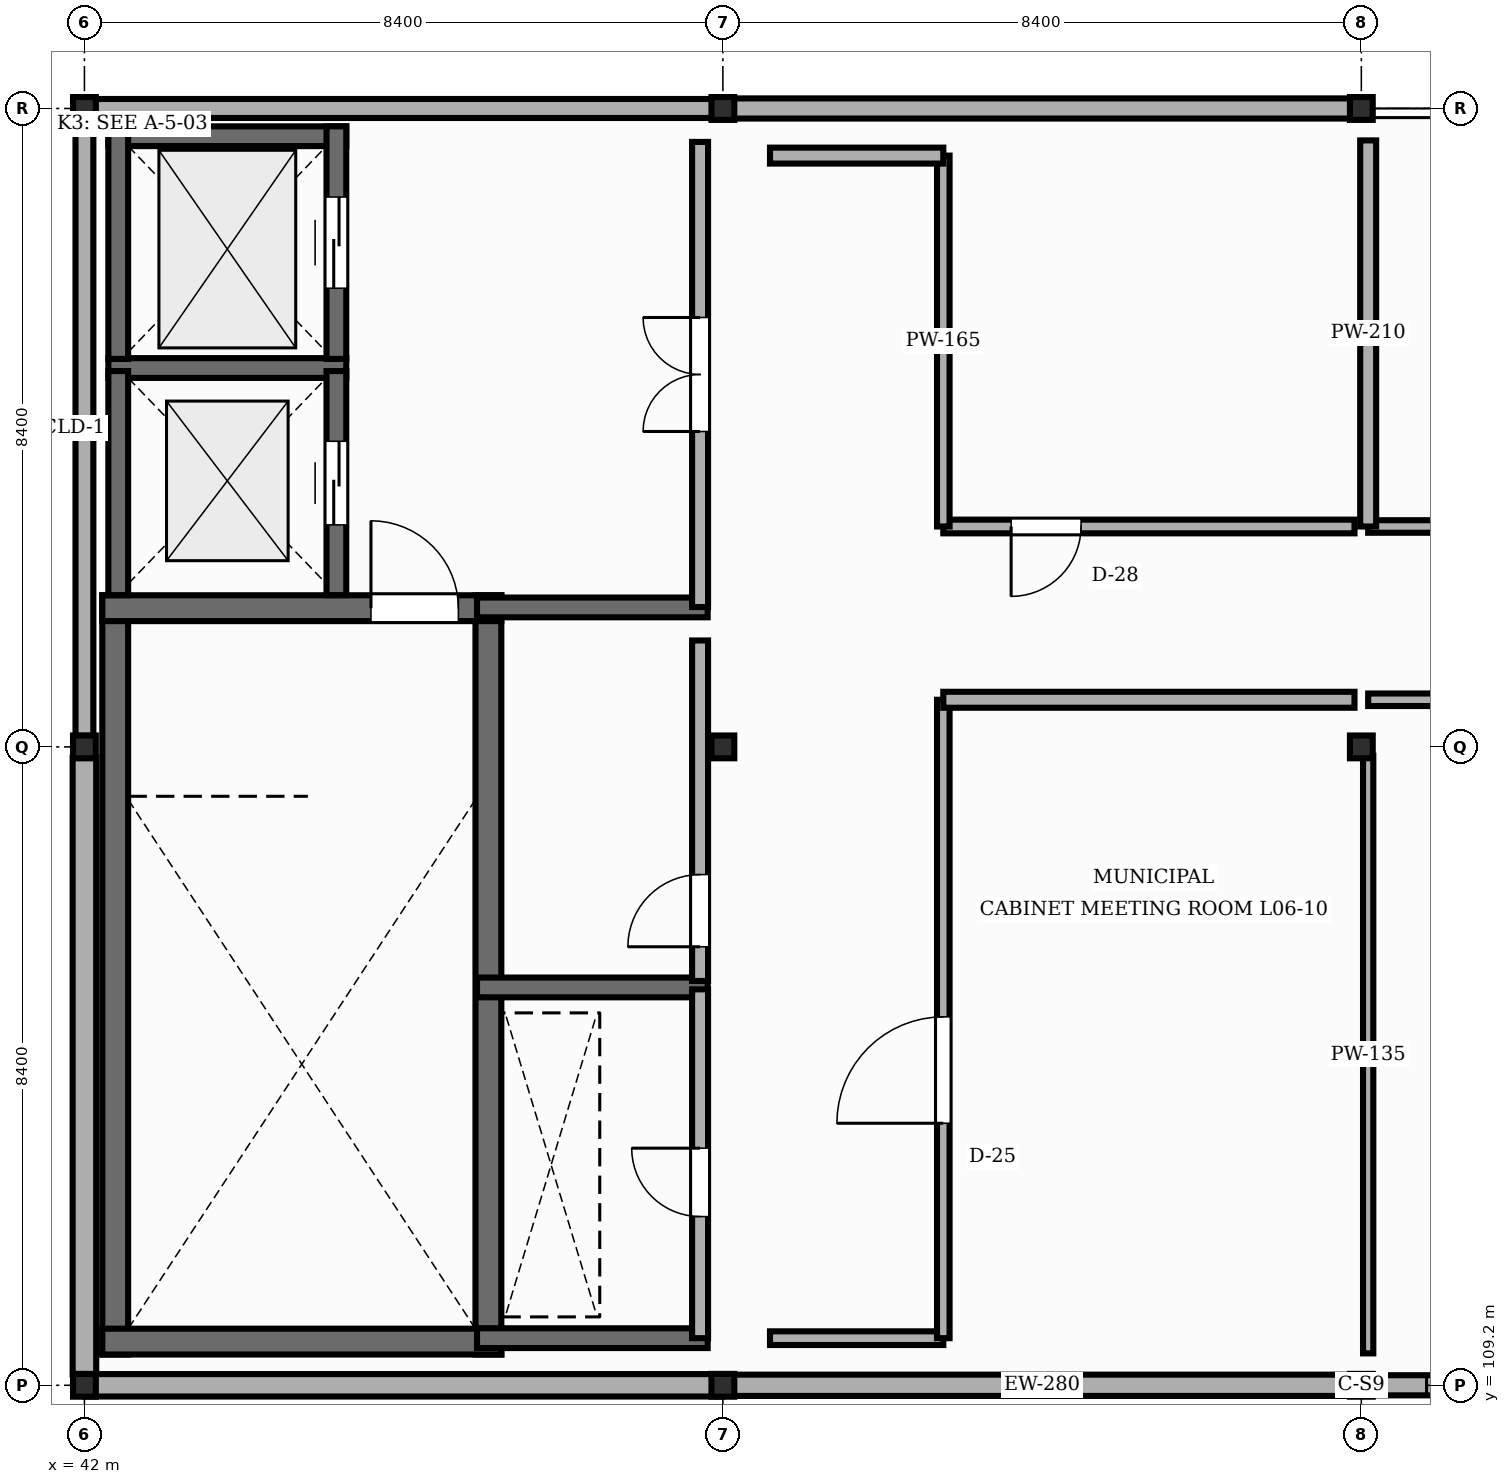
"""IFC4 building model, lengths in metres.
Left out: names, types, materials, properties, quantities, classifications, styles, units other than length and angle.
Written with IfcOpenShell. Run it as: python <this file> out.ifc"""

import sys

from ifc_helpers import new_model, si_unit, direction, frame, frame_2d, origin, origin_2d, place, context, subcontext, project, spatial, rectangle, i_section, extrude, element, fill, save


model = new_model("IFC4")
c1 = context("Model", 3, precision=1e-05, world=origin(), true_north=direction((0.0, 1.0)))
c2 = subcontext(c1, "Body", "Model", "MODEL_VIEW")
j1 = project(units=[si_unit("LENGTHUNIT", "METRE"), si_unit("PLANEANGLEUNIT", "RADIAN")], contexts=[c1])
p1 = place(None, origin())
s1 = spatial("IfcSite", under=j1, at=p1, CompositionType="ELEMENT")
p2 = place(p1, origin())
s2 = spatial("IfcBuilding", under=s1, at=p2, CompositionType="ELEMENT")
p3 = place(p2, frame((0.0, 0.0, 26.1)))
s3 = spatial("IfcBuildingStorey", under=s2, at=p3, CompositionType="ELEMENT", Elevation=26.1)
for number, where, z_axis, x_axis in (
    (1, (42.0, 109.2, 0.0), (0.0, 0.0, 1.0), (1.0, 0.0, 0.0)),
    (2, (42.0, 117.6, 0.0), (0.0, 0.0, 1.0), (1.0, 0.0, 0.0)),
    (3, (42.0, 126.0, 0.0), (0.0, 0.0, 1.0), (1.0, 0.0, 0.0)),
    (4, (50.4, 109.2, 0.0), (0.0, 0.0, 1.0), (1.0, 0.0, 0.0)),
    (5, (50.4, 117.6, 0.0), (0.0, 0.0, 1.0), (1.0, 0.0, 0.0)),
    (6, (50.4, 126.0, 0.0), (0.0, 0.0, 1.0), (1.0, 0.0, 0.0)),
    (7, (58.8, 109.2, 0.0), (0.0, 0.0, 1.0), (1.0, 0.0, 0.0)),
    (8, (58.8, 117.6, 0.0), (0.0, 0.0, 1.0), (1.0, 0.0, 0.0)),
    (9, (58.8, 126.0, 0.0), (0.0, 0.0, 1.0), (1.0, 0.0, 0.0)),
):
    element("IfcColumn", number, at=place(p3, frame(where, z_axis=z_axis, x_axis=x_axis)), inside=s3, PredefinedType="COLUMN", context=c2, shape_type="SweptSolid", body=[
        extrude(i_section(OverallWidth=0.3, OverallDepth=0.3, WebThickness=0.011, FlangeThickness=0.019, FilletRadius=0.027, at=origin_2d()), origin(), (0.0, 0.0, 1.0), 4.05),
    ])
p4 = place(p3, frame((58.792, 126.0, 0.0), z_axis=(0.0, 0.0, 1.0), x_axis=(-1.0, 0.0, 0.0)))
e10 = element("IfcWall", 10, at=p4, inside=s3, PredefinedType="STANDARD", context=c2, shape_type="SweptSolid", body=[
    extrude(rectangle(XDim=8.384, YDim=0.265, at=frame_2d((4.192, 0.0))), origin(), (0.0, 0.0, 1.0), 3.527),
])
p5 = place(p3, frame((50.392, 126.0, 0.0), z_axis=(0.0, 0.0, 1.0), x_axis=(-1.0, 0.0, 0.0)))
e11 = element("IfcWall", 11, at=p5, inside=s3, PredefinedType="STANDARD", context=c2, shape_type="SweptSolid", body=[
    extrude(rectangle(XDim=8.384, YDim=0.25, at=frame_2d((4.192, 0.0))), origin(), (0.0, 0.0, 1.0), 3.497),
])
p6 = place(p3, frame((42.0, 125.854, 0.0), z_axis=(0.0, 0.0, 1.0), x_axis=(0.0, -1.0, 0.0)))
e12 = element("IfcWall", 12, at=p6, inside=s3, PredefinedType="STANDARD", context=c2, shape_type="SweptSolid", body=[
    extrude(rectangle(XDim=8.108, YDim=0.235, at=frame_2d((4.054, 0.0))), origin(), (0.0, 0.0, 1.0), 3.587),
])
p7 = place(p3, frame((42.0, 117.454, 0.0), z_axis=(0.0, 0.0, 1.0), x_axis=(0.0, -1.0, 0.0)))
e13 = element("IfcWall", 13, at=p7, inside=s3, PredefinedType="STANDARD", context=c2, shape_type="SweptSolid", body=[
    extrude(rectangle(XDim=8.108, YDim=0.31, at=frame_2d((4.054, 0.0))), origin(), (0.0, 0.0, 1.0), 3.497),
])
p8 = place(p3, frame((42.008, 109.2, 0.0), z_axis=(0.0, 0.0, 1.0), x_axis=(1.0, 0.0, 0.0)))
e14 = element("IfcWall", 14, at=p8, inside=s3, PredefinedType="STANDARD", context=c2, shape_type="SweptSolid", body=[
    extrude(rectangle(XDim=8.384, YDim=0.295, at=frame_2d((4.192, 0.0))), origin(), (0.0, 0.0, 1.0), 3.497),
])
p9 = place(p3, frame((50.408, 109.2, 0.0), z_axis=(0.0, 0.0, 1.0), x_axis=(1.0, 0.0, 0.0)))
e15 = element("IfcWall", 15, at=p9, inside=s3, PredefinedType="STANDARD", context=c2, shape_type="SweptSolid", body=[
    extrude(rectangle(XDim=8.384, YDim=0.28, at=frame_2d((4.192, 0.0))), origin(), (0.0, 0.0, 1.0), 3.527),
])
p10 = place(p3, frame((58.808, 109.2, 0.0), z_axis=(0.0, 0.0, 1.0), x_axis=(1.0, 0.0, 0.0)))
e16 = element("IfcWall", 16, at=p10, inside=s3, PredefinedType="STANDARD", context=c2, shape_type="SweptSolid", body=[
    extrude(rectangle(XDim=8.384, YDim=0.265, at=frame_2d((4.192, 0.0))), origin(), (0.0, 0.0, 1.0), 3.497),
])
p11 = place(p10, frame((0.85, 0.0, 0.9)))
e17 = element("IfcOpeningElement", 17, at=p11, cuts=e16, PredefinedType="OPENING", context=c2, shape_type="SweptSolid", body=[
    extrude(rectangle(XDim=1.52, YDim=1.65, at=frame_2d((0.76, 0.825))), frame((0.0, 0.142, 0.0), z_axis=(0.0, -1.0, 0.0), x_axis=(1.0, 0.0, 0.0)), (0.0, 0.0, 1.0), 0.285),
])
p12 = place(p10, frame((5.914, 0.0, 0.9)))
e18 = element("IfcOpeningElement", 18, at=p12, cuts=e16, PredefinedType="OPENING", context=c2, shape_type="SweptSolid", body=[
    extrude(rectangle(XDim=1.62, YDim=1.65, at=frame_2d((0.81, 0.825))), frame((0.0, 0.142, 0.0), z_axis=(0.0, -1.0, 0.0), x_axis=(1.0, 0.0, 0.0)), (0.0, 0.0, 1.0), 0.285),
])
for number, where, z_axis, x_axis in (
    (19, (42.405, 109.605, 0.0), (0.0, 0.0, 1.0), (0.0, 1.0, 0.0)),
    (20, (47.315, 109.605, 0.0), (0.0, 0.0, 1.0), (0.0, 1.0, 0.0)),
):
    element("IfcWall", number, at=place(p3, frame(where, z_axis=z_axis, x_axis=x_axis)), inside=s3, PredefinedType="SHEAR", context=c2, shape_type="SweptSolid", body=[
        extrude(rectangle(XDim=9.99, YDim=0.34, at=frame_2d((4.995, 0.0))), origin(), (0.0, 0.0, 1.0), 3.85),
    ])
p13 = place(p3, frame((42.235, 109.775, 0.0), z_axis=(0.0, 0.0, 1.0), x_axis=(1.0, 0.0, 0.0)))
e21 = element("IfcWall", 21, at=p13, inside=s3, PredefinedType="SHEAR", context=c2, shape_type="SweptSolid", body=[
    extrude(rectangle(XDim=5.25, YDim=0.34, at=frame_2d((2.625, 0.0))), origin(), (0.0, 0.0, 1.0), 3.85),
])
p14 = place(p3, frame((42.235, 119.425, 0.0), z_axis=(0.0, 0.0, 1.0), x_axis=(1.0, 0.0, 0.0)))
e22 = element("IfcWall", 22, at=p14, inside=s3, PredefinedType="SHEAR", context=c2, shape_type="SweptSolid", body=[
    extrude(rectangle(XDim=5.25, YDim=0.34, at=frame_2d((2.625, 0.0))), origin(), (0.0, 0.0, 1.0), 3.85),
])
p15 = place(p14, frame((3.535, 0.0, 0.0)))
e23 = element("IfcOpeningElement", 23, at=p15, cuts=e22, PredefinedType="OPENING", context=c2, shape_type="SweptSolid", body=[
    extrude(rectangle(XDim=1.15, YDim=2.15, at=frame_2d((0.575, 1.075))), frame((0.0, 0.18, 0.0), z_axis=(0.0, -1.0, 0.0), x_axis=(1.0, 0.0, 0.0)), (0.0, 0.0, 1.0), 0.36),
])
p16 = place(p3, frame((42.315, 122.585, 0.0), z_axis=(0.0, 0.0, 1.0), x_axis=(1.0, 0.0, 0.0)))
e24 = element("IfcWall", 24, at=p16, inside=s3, PredefinedType="SHEAR", context=c2, shape_type="SweptSolid", body=[
    extrude(rectangle(XDim=3.13, YDim=0.26, at=frame_2d((1.565, 0.0))), origin(), (0.0, 0.0, 1.0), 3.85),
])
p17 = place(p3, frame((42.445, 119.597, 0.0), z_axis=(0.0, 0.0, 1.0), x_axis=(0.0, 1.0, 0.0)))
e25 = element("IfcWall", 25, at=p17, inside=s3, PredefinedType="SHEAR", context=c2, shape_type="SweptSolid", body=[
    extrude(rectangle(XDim=2.948, YDim=0.26, at=frame_2d((1.474, 0.0))), origin(), (0.0, 0.0, 1.0), 3.85),
])
p18 = place(p3, frame((45.315, 119.597, 0.0), z_axis=(0.0, 0.0, 1.0), x_axis=(0.0, 1.0, 0.0)))
e26 = element("IfcWall", 26, at=p18, inside=s3, PredefinedType="SHEAR", context=c2, shape_type="SweptSolid", body=[
    extrude(rectangle(XDim=2.948, YDim=0.26, at=frame_2d((1.474, 0.0))), origin(), (0.0, 0.0, 1.0), 3.85),
])
p19 = place(p18, frame((0.924, 0.0, 0.0)))
e27 = element("IfcOpeningElement", 27, at=p19, cuts=e26, PredefinedType="OPENING", context=c2, shape_type="SweptSolid", body=[
    extrude(rectangle(XDim=1.1, YDim=2.15, at=frame_2d((0.55, 1.075))), frame((0.0, 0.14, 0.0), z_axis=(0.0, -1.0, 0.0), x_axis=(1.0, 0.0, 0.0)), (0.0, 0.0, 1.0), 0.28),
])
p20 = place(p3, frame((42.315, 125.635, 0.0), z_axis=(0.0, 0.0, 1.0), x_axis=(1.0, 0.0, 0.0)))
e28 = element("IfcWall", 28, at=p20, inside=s3, PredefinedType="SHEAR", context=c2, shape_type="SweptSolid", body=[
    extrude(rectangle(XDim=3.13, YDim=0.26, at=frame_2d((1.565, 0.0))), origin(), (0.0, 0.0, 1.0), 3.85),
])
p21 = place(p3, frame((42.445, 122.705, 0.0), z_axis=(0.0, 0.0, 1.0), x_axis=(0.0, 1.0, 0.0)))
e29 = element("IfcWall", 29, at=p21, inside=s3, PredefinedType="SHEAR", context=c2, shape_type="SweptSolid", body=[
    extrude(rectangle(XDim=3.06, YDim=0.26, at=frame_2d((1.53, 0.0))), origin(), (0.0, 0.0, 1.0), 3.85),
])
p22 = place(p3, frame((45.315, 122.705, 0.0), z_axis=(0.0, 0.0, 1.0), x_axis=(0.0, 1.0, 0.0)))
e30 = element("IfcWall", 30, at=p22, inside=s3, PredefinedType="SHEAR", context=c2, shape_type="SweptSolid", body=[
    extrude(rectangle(XDim=3.06, YDim=0.26, at=frame_2d((1.53, 0.0))), origin(), (0.0, 0.0, 1.0), 3.85),
])
p23 = place(p22, frame((0.93, 0.0, 0.0)))
e31 = element("IfcOpeningElement", 31, at=p23, cuts=e30, PredefinedType="OPENING", context=c2, shape_type="SweptSolid", body=[
    extrude(rectangle(XDim=1.2, YDim=2.15, at=frame_2d((0.6, 1.075))), frame((0.0, 0.14, 0.0), z_axis=(0.0, -1.0, 0.0), x_axis=(1.0, 0.0, 0.0)), (0.0, 0.0, 1.0), 0.28),
])
for number, where, z_axis, x_axis in (
    (32, (47.165, 109.82, 0.0), (0.0, 0.0, 1.0), (1.0, 0.0, 0.0)),
    (33, (47.165, 114.435, 0.0), (0.0, 0.0, 1.0), (1.0, 0.0, 0.0)),
    (34, (47.165, 119.435, 0.0), (0.0, 0.0, 1.0), (1.0, 0.0, 0.0)),
):
    element("IfcWall", number, at=place(p3, frame(where, z_axis=z_axis, x_axis=x_axis)), inside=s3, PredefinedType="SHEAR", context=c2, shape_type="SweptSolid", body=[
        extrude(rectangle(XDim=3.035, YDim=0.26, at=frame_2d((1.518, 0.0))), origin(), (0.0, 0.0, 1.0), 3.85),
    ])
p24 = place(p3, frame((50.1, 109.82, 0.0), z_axis=(0.0, 0.0, 1.0), x_axis=(0.0, 1.0, 0.0)))
e35 = element("IfcWall", 35, at=p24, inside=s3, PredefinedType="STANDARD", context=c2, shape_type="SweptSolid", body=[
    extrude(rectangle(XDim=4.59, YDim=0.21, at=frame_2d((2.295, 0.0))), origin(), (0.0, 0.0, 1.0), 3.587),
])
p25 = place(p24, frame((1.6, 0.0, 0.0)))
e36 = element("IfcOpeningElement", 36, at=p25, cuts=e35, PredefinedType="OPENING", context=c2, shape_type="SweptSolid", body=[
    extrude(rectangle(XDim=0.9, YDim=2.1, at=frame_2d((0.45, 1.05))), frame((0.0, 0.115, 0.0), z_axis=(0.0, -1.0, 0.0), x_axis=(1.0, 0.0, 0.0)), (0.0, 0.0, 1.0), 0.23),
])
p26 = place(p3, frame((50.1, 114.52, 0.0), z_axis=(0.0, 0.0, 1.0), x_axis=(0.0, 1.0, 0.0)))
e37 = element("IfcWall", 37, at=p26, inside=s3, PredefinedType="STANDARD", context=c2, shape_type="SweptSolid", body=[
    extrude(rectangle(XDim=4.48, YDim=0.21, at=frame_2d((2.24, 0.0))), origin(), (0.0, 0.0, 1.0), 3.497),
])
p27 = place(p26, frame((0.45, 0.0, 0.0)))
e38 = element("IfcOpeningElement", 38, at=p27, cuts=e37, PredefinedType="OPENING", context=c2, shape_type="SweptSolid", body=[
    extrude(rectangle(XDim=0.95, YDim=2.15, at=frame_2d((0.475, 1.075))), frame((0.0, 0.115, 0.0), z_axis=(0.0, -1.0, 0.0), x_axis=(1.0, 0.0, 0.0)), (0.0, 0.0, 1.0), 0.23),
])
p28 = place(p3, frame((50.1, 119.44, 0.0), z_axis=(0.0, 0.0, 1.0), x_axis=(0.0, 1.0, 0.0)))
e39 = element("IfcWall", 39, at=p28, inside=s3, PredefinedType="STANDARD", context=c2, shape_type="SweptSolid", body=[
    extrude(rectangle(XDim=6.12, YDim=0.21, at=frame_2d((3.06, 0.0))), origin(), (0.0, 0.0, 1.0), 3.497),
])
p29 = place(p28, frame((2.31, 0.0, 0.0)))
e40 = element("IfcOpeningElement", 40, at=p29, cuts=e39, PredefinedType="OPENING", context=c2, shape_type="SweptSolid", body=[
    extrude(rectangle(XDim=1.5, YDim=2.2, at=frame_2d((0.75, 1.1))), frame((0.0, 0.115, 0.0), z_axis=(0.0, -1.0, 0.0), x_axis=(1.0, 0.0, 0.0)), (0.0, 0.0, 1.0), 0.23),
])
p30 = place(p3, frame((58.89, 109.62, -0.004), z_axis=(0.0, 0.0, 1.0), x_axis=(0.0, 1.0, 0.0)))
e41 = element("IfcWall", 41, at=p30, inside=s3, PredefinedType="STANDARD", context=c2, shape_type="SweptSolid", body=[
    extrude(rectangle(XDim=7.865, YDim=0.135, at=frame_2d((3.933, 0.0))), origin(), (0.0, 0.0, 1.0), 3.501),
])
p31 = place(p3, frame((58.89, 118.22, -0.004), z_axis=(0.0, 0.0, 1.0), x_axis=(1.0, 0.0, 0.0)))
e42 = element("IfcWall", 42, at=p31, inside=s3, PredefinedType="STANDARD", context=c2, shape_type="SweptSolid", body=[
    extrude(rectangle(XDim=11.02, YDim=0.165, at=frame_2d((5.51, 0.0))), origin(), (0.0, 0.0, 1.0), 3.854),
])
p32 = place(p31, frame((3.157, 0.0, 0.0)))
e43 = element("IfcOpeningElement", 43, at=p32, cuts=e42, PredefinedType="OPENING", context=c2, shape_type="SweptSolid", body=[
    extrude(rectangle(XDim=1.4, YDim=2.14, at=frame_2d((0.7, 1.07))), frame((0.0, 0.093, 0.0), z_axis=(0.0, -1.0, 0.0), x_axis=(1.0, 0.0, 0.0)), (0.0, 0.0, 1.0), 0.185),
])
p33 = place(p3, frame((69.91, 120.5, -0.004), z_axis=(0.0, 0.0, 1.0), x_axis=(-1.0, 0.0, 0.0)))
e44 = element("IfcWall", 44, at=p33, inside=s3, PredefinedType="STANDARD", context=c2, shape_type="SweptSolid", body=[
    extrude(rectangle(XDim=11.02, YDim=0.165, at=frame_2d((5.51, 0.0))), origin(), (0.0, 0.0, 1.0), 3.854),
])
p34 = place(p33, frame((6.303, 0.0, 0.0)))
e45 = element("IfcOpeningElement", 45, at=p34, cuts=e44, PredefinedType="OPENING", context=c2, shape_type="SweptSolid", body=[
    extrude(rectangle(XDim=1.72, YDim=2.14, at=frame_2d((0.86, 1.07))), frame((0.0, 0.093, 0.0), z_axis=(0.0, -1.0, 0.0), x_axis=(1.0, 0.0, 0.0)), (0.0, 0.0, 1.0), 0.185),
])
p35 = place(p3, frame((58.89, 120.5, -0.004), z_axis=(0.0, 0.0, 1.0), x_axis=(0.0, 1.0, 0.0)))
e46 = element("IfcWall", 46, at=p35, inside=s3, PredefinedType="STANDARD", context=c2, shape_type="SweptSolid", body=[
    extrude(rectangle(XDim=5.08, YDim=0.21, at=frame_2d((2.54, 0.0))), origin(), (0.0, 0.0, 1.0), 3.591),
])
p36 = place(p3, frame((51.02, 109.82, -0.004), z_axis=(0.0, 0.0, 1.0), x_axis=(1.0, 0.0, 0.0)))
e47 = element("IfcWall", 47, at=p36, inside=s3, PredefinedType="STANDARD", context=c2, shape_type="SweptSolid", body=[
    extrude(rectangle(XDim=2.28, YDim=0.18, at=frame_2d((1.14, 0.0))), origin(), (0.0, 0.0, 1.0), 3.854),
])
p37 = place(p3, frame((53.3, 109.82, -0.004), z_axis=(0.0, 0.0, 1.0), x_axis=(0.0, 1.0, 0.0)))
e48 = element("IfcWall", 48, at=p37, inside=s3, PredefinedType="STANDARD", context=c2, shape_type="SweptSolid", body=[
    extrude(rectangle(XDim=8.4, YDim=0.165, at=frame_2d((4.2, 0.0))), origin(), (0.0, 0.0, 1.0), 3.854),
])
p38 = place(p37, frame((2.828, 0.0, 0.0)))
e49 = element("IfcOpeningElement", 49, at=p38, cuts=e48, PredefinedType="OPENING", context=c2, shape_type="SweptSolid", body=[
    extrude(rectangle(XDim=1.4, YDim=2.22, at=frame_2d((0.7, 1.11))), frame((0.0, 0.093, 0.0), z_axis=(0.0, -1.0, 0.0), x_axis=(1.0, 0.0, 0.0)), (0.0, 0.0, 1.0), 0.185),
])
p39 = place(p3, frame((53.3, 118.22, -0.004), z_axis=(0.0, 0.0, 1.0), x_axis=(1.0, 0.0, 0.0)))
e50 = element("IfcWall", 50, at=p39, inside=s3, PredefinedType="STANDARD", context=c2, shape_type="SweptSolid", body=[
    extrude(rectangle(XDim=5.41, YDim=0.21, at=frame_2d((2.705, 0.0))), origin(), (0.0, 0.0, 1.0), 3.854),
])
p40 = place(p3, frame((58.71, 120.5, -0.004), z_axis=(0.0, 0.0, 1.0), x_axis=(-1.0, 0.0, 0.0)))
e51 = element("IfcWall", 51, at=p40, inside=s3, PredefinedType="STANDARD", context=c2, shape_type="SweptSolid", body=[
    extrude(rectangle(XDim=5.41, YDim=0.18, at=frame_2d((2.705, 0.0))), origin(), (0.0, 0.0, 1.0), 3.854),
])
p41 = place(p40, frame((3.597, 0.0, 0.0)))
e52 = element("IfcOpeningElement", 52, at=p41, cuts=e51, PredefinedType="OPENING", context=c2, shape_type="SweptSolid", body=[
    extrude(rectangle(XDim=0.92, YDim=2.3, at=frame_2d((0.46, 1.15))), frame((0.0, 0.1, 0.0), z_axis=(0.0, -1.0, 0.0), x_axis=(1.0, 0.0, 0.0)), (0.0, 0.0, 1.0), 0.2),
])
p42 = place(p3, frame((53.3, 120.5, -0.004), z_axis=(0.0, 0.0, 1.0), x_axis=(0.0, 1.0, 0.0)))
e53 = element("IfcWall", 53, at=p42, inside=s3, PredefinedType="STANDARD", context=c2, shape_type="SweptSolid", body=[
    extrude(rectangle(XDim=4.88, YDim=0.165, at=frame_2d((2.44, 0.0))), origin(), (0.0, 0.0, 1.0), 3.854),
])
p43 = place(p3, frame((53.3, 125.38, -0.004), z_axis=(0.0, 0.0, 1.0), x_axis=(-1.0, 0.0, 0.0)))
e54 = element("IfcWall", 54, at=p43, inside=s3, PredefinedType="STANDARD", context=c2, shape_type="SweptSolid", body=[
    extrude(rectangle(XDim=2.28, YDim=0.21, at=frame_2d((1.14, 0.0))), origin(), (0.0, 0.0, 1.0), 3.854),
])
p44 = place(p11, origin())
e55 = element("IfcWindow", 55, at=p44, inside=s3, PartitioningType="SINGLE_PANEL", PredefinedType="WINDOW", context=c2, shape_type="SweptSolid", body=[
    extrude(rectangle(XDim=1.52, YDim=1.65, at=frame_2d((0.76, 0.825))), frame((0.0, 0.03, 0.0), z_axis=(0.0, -1.0, 0.0), x_axis=(1.0, 0.0, 0.0)), (0.0, 0.0, 1.0), 0.06),
])
fill(e17, e55)
p45 = place(p15, origin())
e56 = element("IfcDoor", 56, at=p45, inside=s3, OperationType="SINGLE_SWING_LEFT", PredefinedType="DOOR", context=c2, shape_type="SweptSolid", body=[
    extrude(rectangle(XDim=1.15, YDim=2.15, at=frame_2d((0.575, 1.075))), frame((0.0, 0.025, 0.0), z_axis=(0.0, -1.0, 0.0), x_axis=(1.0, 0.0, 0.0)), (0.0, 0.0, 1.0), 0.05),
])
fill(e23, e56)
p46 = place(p19, origin())
e57 = element("IfcDoor", 57, at=p46, inside=s3, OperationType="DOUBLE_DOOR_SLIDING", PredefinedType="DOOR", context=c2, shape_type="SweptSolid", body=[
    extrude(rectangle(XDim=1.1, YDim=2.15, at=frame_2d((0.55, 1.075))), frame((0.0, 0.025, 0.0), z_axis=(0.0, -1.0, 0.0), x_axis=(1.0, 0.0, 0.0)), (0.0, 0.0, 1.0), 0.05),
])
fill(e27, e57)
p47 = place(p23, origin())
e58 = element("IfcDoor", 58, at=p47, inside=s3, OperationType="DOUBLE_DOOR_SLIDING", PredefinedType="DOOR", context=c2, shape_type="SweptSolid", body=[
    extrude(rectangle(XDim=1.2, YDim=2.15, at=frame_2d((0.6, 1.075))), frame((0.0, 0.025, 0.0), z_axis=(0.0, -1.0, 0.0), x_axis=(1.0, 0.0, 0.0)), (0.0, 0.0, 1.0), 0.05),
])
fill(e31, e58)
p48 = place(p25, origin())
e59 = element("IfcDoor", 59, at=p48, inside=s3, OperationType="SINGLE_SWING_RIGHT", PredefinedType="DOOR", context=c2, shape_type="SweptSolid", body=[
    extrude(rectangle(XDim=0.9, YDim=2.1, at=frame_2d((0.45, 1.05))), frame((0.0, 0.025, 0.0), z_axis=(0.0, -1.0, 0.0), x_axis=(1.0, 0.0, 0.0)), (0.0, 0.0, 1.0), 0.05),
])
fill(e36, e59)
p49 = place(p27, origin())
e60 = element("IfcDoor", 60, at=p49, inside=s3, OperationType="SINGLE_SWING_LEFT", PredefinedType="DOOR", context=c2, shape_type="SweptSolid", body=[
    extrude(rectangle(XDim=0.95, YDim=2.15, at=frame_2d((0.475, 1.075))), frame((0.0, 0.025, 0.0), z_axis=(0.0, -1.0, 0.0), x_axis=(1.0, 0.0, 0.0)), (0.0, 0.0, 1.0), 0.05),
])
fill(e38, e60)
p50 = place(p29, origin())
e61 = element("IfcDoor", 61, at=p50, inside=s3, OperationType="DOUBLE_DOOR_SINGLE_SWING", PredefinedType="DOOR", context=c2, shape_type="SweptSolid", body=[
    extrude(rectangle(XDim=1.5, YDim=2.2, at=frame_2d((0.75, 1.1))), frame((0.0, 0.025, 0.0), z_axis=(0.0, -1.0, 0.0), x_axis=(1.0, 0.0, 0.0)), (0.0, 0.0, 1.0), 0.05),
])
fill(e40, e61)
p51 = place(p38, origin())
e62 = element("IfcDoor", 62, at=p51, inside=s3, OperationType="SINGLE_SWING_LEFT", PredefinedType="DOOR", context=c2, shape_type="SweptSolid", body=[
    extrude(rectangle(XDim=1.4, YDim=2.22, at=frame_2d((0.7, 1.11))), frame((0.0, 0.025, 0.0), z_axis=(0.0, -1.0, 0.0), x_axis=(1.0, 0.0, 0.0)), (0.0, 0.0, 1.0), 0.05),
])
fill(e49, e62)
p52 = place(p41, origin())
e63 = element("IfcDoor", 63, at=p52, inside=s3, OperationType="SINGLE_SWING_RIGHT", PredefinedType="DOOR", context=c2, shape_type="SweptSolid", body=[
    extrude(rectangle(XDim=0.92, YDim=2.3, at=frame_2d((0.46, 1.15))), frame((0.0, 0.025, 0.0), z_axis=(0.0, -1.0, 0.0), x_axis=(1.0, 0.0, 0.0)), (0.0, 0.0, 1.0), 0.05),
])
fill(e52, e63)
save(model, sys.argv[1])
